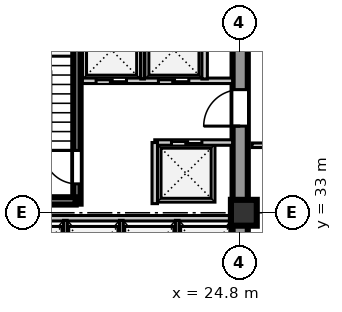
"""IFC4 building model, lengths in metres.
Left out: names, types, materials, properties, quantities, classifications, styles, units other than length and angle.
Written with IfcOpenShell. Run it as: python <this file> out.ifc"""

import sys

from ifc_helpers import new_model, si_unit, direction, frame, frame_2d, origin, origin_2d, place, context, subcontext, project, spatial, rectangle, extrude, element, fill, save


model = new_model("IFC4")
c1 = context("Model", 3, precision=1e-05, world=origin(), true_north=direction((0.0, 1.0)))
c2 = subcontext(c1, "Body", "Model", "MODEL_VIEW")
j1 = project(units=[si_unit("LENGTHUNIT", "METRE"), si_unit("PLANEANGLEUNIT", "RADIAN")], contexts=[c1])
p1 = place(None, origin())
s1 = spatial("IfcSite", under=j1, at=p1, CompositionType="ELEMENT")
p2 = place(p1, origin())
s2 = spatial("IfcBuilding", under=s1, at=p2, CompositionType="ELEMENT")
p3 = place(p2, frame((0.0, 0.0, 196.4)))
s3 = spatial("IfcBuildingStorey", under=s2, at=p3, CompositionType="ELEMENT", Elevation=196.4)
p4 = place(p3, frame((24.83, 15.74, 0.0), z_axis=(0.0, 0.0, 1.0), x_axis=(0.0, 1.0, 0.0)))
e1 = element("IfcWall", 1, at=p4, inside=s3, PredefinedType="SHEAR", context=c2, shape_type="SweptSolid", body=[
    extrude(rectangle(XDim=25.76, YDim=0.5, at=frame_2d((12.88, 0.0))), origin(), (0.0, 0.0, 1.0), 3.6),
])
p5 = place(p4, frame((1.61, 0.0, 0.0)))
e2 = element("IfcOpeningElement", 2, at=p5, cuts=e1, PredefinedType="OPENING", context=c2, shape_type="SweptSolid", body=[
    extrude(rectangle(XDim=1.2, YDim=2.1, at=frame_2d((0.6, 1.05))), frame((0.0, 0.26, 0.0), z_axis=(0.0, -1.0, 0.0), x_axis=(1.0, 0.0, 0.0)), (0.0, 0.0, 1.0), 0.52),
])
p6 = place(p4, frame((6.78, 0.0, 0.0)))
e3 = element("IfcOpeningElement", 3, at=p6, cuts=e1, PredefinedType="OPENING", context=c2, shape_type="SweptSolid", body=[
    extrude(rectangle(XDim=0.85, YDim=2.06, at=frame_2d((0.425, 1.03))), frame((0.0, 0.26, 0.0), z_axis=(0.0, -1.0, 0.0), x_axis=(1.0, 0.0, 0.0)), (0.0, 0.0, 1.0), 0.52),
])
p7 = place(p4, frame((12.11, 0.0, 0.0)))
e4 = element("IfcOpeningElement", 4, at=p7, cuts=e1, PredefinedType="OPENING", context=c2, shape_type="SweptSolid", body=[
    extrude(rectangle(XDim=1.5, YDim=2.12, at=frame_2d((0.75, 1.06))), frame((0.0, 0.26, 0.0), z_axis=(0.0, -1.0, 0.0), x_axis=(1.0, 0.0, 0.0)), (0.0, 0.0, 1.0), 0.52),
])
p8 = place(p4, frame((20.11, 0.0, 0.0)))
e5 = element("IfcOpeningElement", 5, at=p8, cuts=e1, PredefinedType="OPENING", context=c2, shape_type="SweptSolid", body=[
    extrude(rectangle(XDim=1.2, YDim=2.12, at=frame_2d((0.6, 1.06))), frame((0.0, 0.26, 0.0), z_axis=(0.0, -1.0, 0.0), x_axis=(1.0, 0.0, 0.0)), (0.0, 0.0, 1.0), 0.52),
])
p9 = place(p4, frame((24.01, 0.0, 0.0)))
e6 = element("IfcOpeningElement", 6, at=p9, cuts=e1, PredefinedType="OPENING", context=c2, shape_type="SweptSolid", body=[
    extrude(rectangle(XDim=0.95, YDim=2.1, at=frame_2d((0.475, 1.05))), frame((0.0, 0.26, 0.0), z_axis=(0.0, -1.0, 0.0), x_axis=(1.0, 0.0, 0.0)), (0.0, 0.0, 1.0), 0.52),
])
p10 = place(p3, frame((24.95, 33.0, 0.0), z_axis=(0.0, 0.0, 1.0), x_axis=(1.0, 0.0, 0.0)))
e7 = element("IfcColumn", 7, at=p10, inside=s3, PredefinedType="COLUMN", context=c2, shape_type="SweptSolid", body=[
    extrude(rectangle(XDim=0.85, YDim=0.85, at=origin_2d()), origin(), (0.0, 0.0, 1.0), 3.6),
])
p11 = place(p3, frame((15.9, 32.82, 0.0), z_axis=(0.0, 0.0, 1.0), x_axis=(1.0, 0.0, 0.0)))
e8 = element("IfcWall", 8, at=p11, inside=s3, PredefinedType="SOLIDWALL", context=c2, shape_type="SweptSolid", body=[
    extrude(rectangle(XDim=8.68, YDim=0.18, at=frame_2d((4.34, 0.0))), origin(), (0.0, 0.0, 1.0), 2.95),
])
for number, where, z_axis, x_axis in (
    (9, (19.08, 30.7, 0.0), (0.0, 0.0, 1.0), (0.0, 1.0, 0.0)),
    (10, (20.92, 30.7, 0.0), (0.0, 0.0, 1.0), (0.0, 1.0, 0.0)),
    (11, (22.76, 30.7, 0.0), (0.0, 0.0, 1.0), (0.0, 1.0, 0.0)),
):
    element("IfcWall", number, at=place(p3, frame(where, z_axis=z_axis, x_axis=x_axis)), inside=s3, PredefinedType="PARTITIONING", context=c2, shape_type="SweptSolid", body=[
        extrude(rectangle(XDim=2.05, YDim=0.12, at=frame_2d((1.025, 0.0))), origin(), (0.0, 0.0, 1.0), 3.6),
    ])
p12 = place(p3, frame((19.46, 33.3, 0.0), z_axis=(0.0, 0.0, 1.0), x_axis=(0.0, 1.0, 0.0)))
e12 = element("IfcWall", 12, at=p12, inside=s3, PredefinedType="SHEAR", context=c2, shape_type="SweptSolid", body=[
    extrude(rectangle(XDim=8.18, YDim=0.24, at=frame_2d((4.09, 0.0))), origin(), (0.0, 0.0, 1.0), 3.85),
])
p13 = place(p12, frame((0.65, 0.0, 0.0)))
e13 = element("IfcOpeningElement", 13, at=p13, cuts=e12, PredefinedType="OPENING", context=c2, shape_type="SweptSolid", body=[
    extrude(rectangle(XDim=1.1, YDim=2.1, at=frame_2d((0.55, 1.05))), frame((0.0, 0.13, 0.0), z_axis=(0.0, -1.0, 0.0), x_axis=(1.0, 0.0, 0.0)), (0.0, 0.0, 1.0), 0.26),
])
p14 = place(p3, frame((15.9, 33.39, 0.0), z_axis=(0.0, 0.0, 1.0), x_axis=(1.0, 0.0, 0.0)))
e14 = element("IfcWall", 14, at=p14, inside=s3, PredefinedType="SHEAR", context=c2, shape_type="SweptSolid", body=[
    extrude(rectangle(XDim=3.52, YDim=0.24, at=frame_2d((1.76, 0.0))), origin(), (0.0, 0.0, 1.0), 3.85),
])
p15 = place(p3, frame((22.02, 35.31, 0.0), z_axis=(0.0, 0.0, 1.0), x_axis=(1.0, 0.0, 0.0)))
e15 = element("IfcWall", 15, at=p15, inside=s3, PredefinedType="SOLIDWALL", context=c2, shape_type="SweptSolid", body=[
    extrude(rectangle(XDim=2.56, YDim=0.18, at=frame_2d((1.28, 0.0))), origin(), (0.0, 0.0, 1.0), 3.6),
])
p16 = place(p15, frame((0.55, 0.0, 0.0)))
e16 = element("IfcOpeningElement", 16, at=p16, cuts=e15, PredefinedType="OPENING", context=c2, shape_type="SweptSolid", body=[
    extrude(rectangle(XDim=1.0, YDim=2.1, at=frame_2d((0.5, 1.05))), frame((0.0, 0.1, 0.0), z_axis=(0.0, -1.0, 0.0), x_axis=(1.0, 0.0, 0.0)), (0.0, 0.0, 1.0), 0.2),
])
p17 = place(p3, frame((22.02, 33.3, 0.0), z_axis=(0.0, 0.0, 1.0), x_axis=(0.0, 1.0, 0.0)))
e17 = element("IfcWall", 17, at=p17, inside=s3, PredefinedType="SOLIDWALL", context=c2, shape_type="SweptSolid", body=[
    extrude(rectangle(XDim=2.01, YDim=0.18, at=frame_2d((1.005, 0.0))), origin(), (0.0, 0.0, 1.0), 3.6),
])
p18 = place(p3, frame((19.64, 37.34, 0.0), z_axis=(0.0, 0.0, 1.0), x_axis=(1.0, 0.0, 0.0)))
e18 = element("IfcWall", 18, at=p18, inside=s3, PredefinedType="SOLIDWALL", context=c2, shape_type="SweptSolid", body=[
    extrude(rectangle(XDim=4.94, YDim=0.18, at=frame_2d((2.47, 0.0))), origin(), (0.0, 0.0, 1.0), 3.6),
])
p19 = place(p18, frame((0.45, 0.0, 0.0)))
e19 = element("IfcOpeningElement", 19, at=p19, cuts=e18, PredefinedType="OPENING", context=c2, shape_type="SweptSolid", body=[
    extrude(rectangle(XDim=1.0, YDim=2.1, at=frame_2d((0.5, 1.05))), frame((0.0, 0.1, 0.0), z_axis=(0.0, -1.0, 0.0), x_axis=(1.0, 0.0, 0.0)), (0.0, 0.0, 1.0), 0.2),
])
p20 = place(p18, frame((2.5, 0.0, 0.0)))
e20 = element("IfcOpeningElement", 20, at=p20, cuts=e18, PredefinedType="OPENING", context=c2, shape_type="SweptSolid", body=[
    extrude(rectangle(XDim=1.0, YDim=2.1, at=frame_2d((0.5, 1.05))), frame((0.0, 0.1, 0.0), z_axis=(0.0, -1.0, 0.0), x_axis=(1.0, 0.0, 0.0)), (0.0, 0.0, 1.0), 0.2),
])
p21 = place(p3, frame((21.62, 37.4, 0.0), z_axis=(0.0, 0.0, 1.0), x_axis=(0.0, 1.0, 0.0)))
e21 = element("IfcWall", 21, at=p21, inside=s3, PredefinedType="PARTITIONING", context=c2, shape_type="SweptSolid", body=[
    extrude(rectangle(XDim=1.9, YDim=0.12, at=frame_2d((0.95, 0.0))), origin(), (0.0, 0.0, 1.0), 3.6),
])
p22 = place(p3, frame((23.66, 37.4, 0.0), z_axis=(0.0, 0.0, 1.0), x_axis=(0.0, 1.0, 0.0)))
e22 = element("IfcWall", 22, at=p22, inside=s3, PredefinedType="SOLIDWALL", context=c2, shape_type="SweptSolid", body=[
    extrude(rectangle(XDim=1.9, YDim=0.18, at=frame_2d((0.95, 0.0))), origin(), (0.0, 0.0, 1.0), 3.6),
])
p23 = place(p3, frame((25.22, 35.22, 0.0), z_axis=(0.0, 0.0, 1.0), x_axis=(1.0, 0.0, 0.0)))
e23 = element("IfcWall", 23, at=p23, inside=s3, PredefinedType="PARTITIONING", context=c2, shape_type="SweptSolid", body=[
    extrude(rectangle(XDim=9.5, YDim=0.15, at=frame_2d((4.75, 0.0))), origin(), (0.0, 0.0, 1.0), 3.6),
])
p24 = place(p23, frame((0.65, 0.0, 0.0)))
e24 = element("IfcOpeningElement", 24, at=p24, cuts=e23, PredefinedType="OPENING", context=c2, shape_type="SweptSolid", body=[
    extrude(rectangle(XDim=0.95, YDim=2.1, at=frame_2d((0.475, 1.05))), frame((0.0, 0.085, 0.0), z_axis=(0.0, -1.0, 0.0), x_axis=(1.0, 0.0, 0.0)), (0.0, 0.0, 1.0), 0.17),
])
p25 = place(p23, frame((5.2, 0.0, 0.0)))
e25 = element("IfcOpeningElement", 25, at=p25, cuts=e23, PredefinedType="OPENING", context=c2, shape_type="SweptSolid", body=[
    extrude(rectangle(XDim=0.95, YDim=2.1, at=frame_2d((0.475, 1.05))), frame((0.0, 0.085, 0.0), z_axis=(0.0, -1.0, 0.0), x_axis=(1.0, 0.0, 0.0)), (0.0, 0.0, 1.0), 0.17),
])
p26 = place(p13, origin())
e26 = element("IfcDoor", 26, at=p26, inside=s3, OperationType="SINGLE_SWING_RIGHT", PredefinedType="DOOR", context=c2, shape_type="SweptSolid", body=[
    extrude(rectangle(XDim=1.1, YDim=2.1, at=frame_2d((0.55, 1.05))), frame((0.0, 0.025, 0.0), z_axis=(0.0, -1.0, 0.0), x_axis=(1.0, 0.0, 0.0)), (0.0, 0.0, 1.0), 0.05),
])
fill(e13, e26)
p27 = place(p8, frame((1.2, 0.0, 0.0), z_axis=(0.0, 0.0, 1.0), x_axis=(-1.0, 0.0, 0.0)))
e27 = element("IfcDoor", 27, at=p27, inside=s3, OperationType="SINGLE_SWING_RIGHT", PredefinedType="DOOR", context=c2, shape_type="SweptSolid", body=[
    extrude(rectangle(XDim=1.2, YDim=2.12, at=frame_2d((0.6, 1.06))), frame((0.0, 0.025, 0.0), z_axis=(0.0, -1.0, 0.0), x_axis=(1.0, 0.0, 0.0)), (0.0, 0.0, 1.0), 0.05),
])
fill(e5, e27)
p28 = place(p19, frame((1.0, 0.0, 0.0), z_axis=(0.0, 0.0, 1.0), x_axis=(-1.0, 0.0, 0.0)))
e28 = element("IfcDoor", 28, at=p28, inside=s3, OperationType="DOUBLE_DOOR_SLIDING", PredefinedType="DOOR", context=c2, shape_type="SweptSolid", body=[
    extrude(rectangle(XDim=1.0, YDim=2.1, at=frame_2d((0.5, 1.05))), frame((0.0, 0.025, 0.0), z_axis=(0.0, -1.0, 0.0), x_axis=(1.0, 0.0, 0.0)), (0.0, 0.0, 1.0), 0.05),
])
fill(e19, e28)
p29 = place(p20, frame((1.0, 0.0, 0.0), z_axis=(0.0, 0.0, 1.0), x_axis=(-1.0, 0.0, 0.0)))
e29 = element("IfcDoor", 29, at=p29, inside=s3, OperationType="DOUBLE_DOOR_SLIDING", PredefinedType="DOOR", context=c2, shape_type="SweptSolid", body=[
    extrude(rectangle(XDim=1.0, YDim=2.1, at=frame_2d((0.5, 1.05))), frame((0.0, 0.025, 0.0), z_axis=(0.0, -1.0, 0.0), x_axis=(1.0, 0.0, 0.0)), (0.0, 0.0, 1.0), 0.05),
])
fill(e20, e29)
p30 = place(p16, origin())
e30 = element("IfcDoor", 30, at=p30, inside=s3, OperationType="DOUBLE_DOOR_SLIDING", PredefinedType="DOOR", context=c2, shape_type="SweptSolid", body=[
    extrude(rectangle(XDim=1.0, YDim=2.1, at=frame_2d((0.5, 1.05))), frame((0.0, 0.025, 0.0), z_axis=(0.0, -1.0, 0.0), x_axis=(1.0, 0.0, 0.0)), (0.0, 0.0, 1.0), 0.05),
])
fill(e16, e30)
save(model, sys.argv[1])
